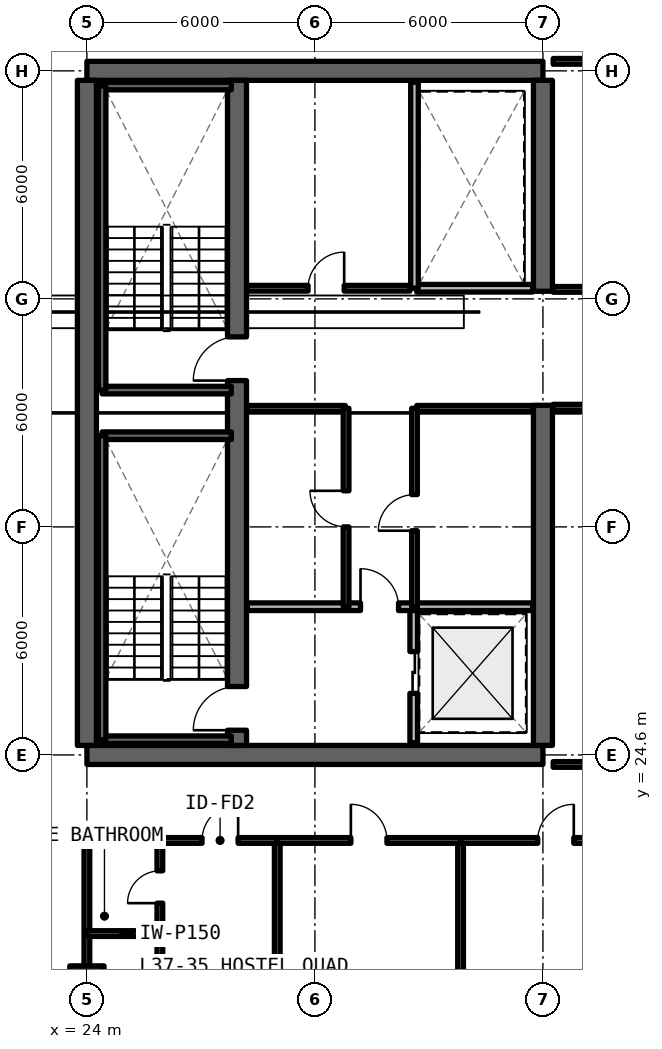
"""IFC4 building model, lengths in metres.
Left out: names, types, materials, properties, quantities, classifications, styles, units other than length and angle.
Written with IfcOpenShell. Run it as: python <this file> out.ifc"""

import sys

from ifc_helpers import new_model, si_unit, direction, frame, frame_2d, origin, origin_2d, place, context, subcontext, project, spatial, rectangle, extrude, element, fill, save


model = new_model("IFC4")
c1 = context("Model", 3, precision=1e-05, world=origin(), true_north=direction((0.0, 1.0)))
c2 = subcontext(c1, "Body", "Model", "MODEL_VIEW")
j1 = project(units=[si_unit("LENGTHUNIT", "METRE"), si_unit("PLANEANGLEUNIT", "RADIAN")], contexts=[c1])
p1 = place(None, origin())
s1 = spatial("IfcSite", under=j1, at=p1, CompositionType="ELEMENT")
p2 = place(p1, origin())
s2 = spatial("IfcBuilding", under=s1, at=p2, CompositionType="ELEMENT")
p3 = place(p2, frame((0.0, 0.0, 135.3)))
s3 = spatial("IfcBuildingStorey", under=s2, at=p3, CompositionType="ELEMENT", Elevation=135.3)
for number, where, z_axis, x_axis in (
    (1, (24.0, 24.6, 0.0), (0.0, 0.0, 1.0), (1.0, 0.0, 0.0)),
    (2, (36.0, 42.6, 0.0), (0.0, 0.0, 1.0), (-1.0, 0.0, 0.0)),
):
    element("IfcWall", number, at=place(p3, frame(where, z_axis=z_axis, x_axis=x_axis)), inside=s3, PredefinedType="SHEAR", context=c2, shape_type="SweptSolid", body=[
        extrude(rectangle(XDim=12.0, YDim=0.5, at=frame_2d((6.0, 0.0))), origin(), (0.0, 0.0, 1.0), 3.3),
    ])
p4 = place(p3, frame((24.0, 24.85, 0.0), z_axis=(0.0, 0.0, 1.0), x_axis=(0.0, 1.0, 0.0)))
e3 = element("IfcWall", 3, at=p4, inside=s3, PredefinedType="SHEAR", context=c2, shape_type="SweptSolid", body=[
    extrude(rectangle(XDim=17.5, YDim=0.5, at=frame_2d((8.75, 0.0))), origin(), (0.0, 0.0, 1.0), 3.3),
])
p5 = place(p3, frame((36.0, 24.85, 0.0), z_axis=(0.0, 0.0, 1.0), x_axis=(0.0, 1.0, 0.0)))
e4 = element("IfcWall", 4, at=p5, inside=s3, PredefinedType="SHEAR", context=c2, shape_type="SweptSolid", body=[
    extrude(rectangle(XDim=8.95, YDim=0.5, at=frame_2d((4.475, 0.0))), origin(), (0.0, 0.0, 1.0), 3.3),
])
p6 = place(p3, frame((36.0, 36.8, 0.0), z_axis=(0.0, 0.0, 1.0), x_axis=(0.0, 1.0, 0.0)))
e5 = element("IfcWall", 5, at=p6, inside=s3, PredefinedType="SHEAR", context=c2, shape_type="SweptSolid", body=[
    extrude(rectangle(XDim=5.55, YDim=0.5, at=frame_2d((2.775, 0.0))), origin(), (0.0, 0.0, 1.0), 3.3),
])
p7 = place(p3, frame((27.95, 24.85, 0.0), z_axis=(0.0, 0.0, 1.0), x_axis=(0.0, 1.0, 0.0)))
e6 = element("IfcWall", 6, at=p7, inside=s3, PredefinedType="SHEAR", context=c2, shape_type="SweptSolid", body=[
    extrude(rectangle(XDim=17.5, YDim=0.5, at=frame_2d((8.75, 0.0))), origin(), (0.0, 0.0, 1.0), 3.3),
])
p8 = place(p7, frame((0.4, 0.0, 0.0)))
e7 = element("IfcOpeningElement", 7, at=p8, cuts=e6, PredefinedType="OPENING", context=c2, shape_type="SweptSolid", body=[
    extrude(rectangle(XDim=1.15, YDim=2.15, at=frame_2d((0.575, 1.075))), frame((0.0, 0.26, 0.0), z_axis=(0.0, -1.0, 0.0), x_axis=(1.0, 0.0, 0.0)), (0.0, 0.0, 1.0), 0.52),
])
p9 = place(p7, frame((9.6, 0.0, 0.0)))
e8 = element("IfcOpeningElement", 8, at=p9, cuts=e6, PredefinedType="OPENING", context=c2, shape_type="SweptSolid", body=[
    extrude(rectangle(XDim=1.15, YDim=2.15, at=frame_2d((0.575, 1.075))), frame((0.0, 0.26, 0.0), z_axis=(0.0, -1.0, 0.0), x_axis=(1.0, 0.0, 0.0)), (0.0, 0.0, 1.0), 0.52),
])
p10 = place(p3, frame((24.0, 18.6, 0.0), z_axis=(0.0, 0.0, 1.0), x_axis=(1.0, 0.0, 0.0)))
e9 = element("IfcColumn", 9, at=p10, inside=s3, PredefinedType="COLUMN", context=c2, shape_type="SweptSolid", body=[
    extrude(rectangle(XDim=0.9, YDim=0.9, at=origin_2d()), origin(), (0.0, 0.0, 1.0), 3.3),
])
p11 = place(p3, frame((32.6, 24.92, 0.0), z_axis=(0.0, 0.0, 1.0), x_axis=(0.0, 1.0, 0.0)))
e10 = element("IfcWall", 10, at=p11, inside=s3, PredefinedType="SOLIDWALL", context=c2, shape_type="SweptSolid", body=[
    extrude(rectangle(XDim=3.58, YDim=0.2, at=frame_2d((1.79, 0.0))), origin(), (0.0, 0.0, 1.0), 2.35),
])
p12 = place(p11, frame((1.3, 0.0, 0.0)))
e11 = element("IfcOpeningElement", 11, at=p12, cuts=e10, PredefinedType="OPENING", context=c2, shape_type="SweptSolid", body=[
    extrude(rectangle(XDim=1.1, YDim=2.2, at=frame_2d((0.55, 1.1))), frame((0.0, 0.11, 0.0), z_axis=(0.0, -1.0, 0.0), x_axis=(1.0, 0.0, 0.0)), (0.0, 0.0, 1.0), 0.22),
])
p13 = place(p3, frame((28.22, 28.5, 0.0), z_axis=(0.0, 0.0, 1.0), x_axis=(1.0, 0.0, 0.0)))
e12 = element("IfcWall", 12, at=p13, inside=s3, PredefinedType="SOLIDWALL", context=c2, shape_type="SweptSolid", body=[
    extrude(rectangle(XDim=7.51, YDim=0.2, at=frame_2d((3.755, 0.0))), origin(), (0.0, 0.0, 1.0), 2.35),
])
p14 = place(p13, frame((2.98, 0.0, 0.0)))
e13 = element("IfcOpeningElement", 13, at=p14, cuts=e12, PredefinedType="OPENING", context=c2, shape_type="SweptSolid", body=[
    extrude(rectangle(XDim=1.0, YDim=2.15, at=frame_2d((0.5, 1.075))), frame((0.0, 0.11, 0.0), z_axis=(0.0, -1.0, 0.0), x_axis=(1.0, 0.0, 0.0)), (0.0, 0.0, 1.0), 0.22),
])
p15 = place(p3, frame((28.22, 33.72, 0.0), z_axis=(0.0, 0.0, 1.0), x_axis=(1.0, 0.0, 0.0)))
e14 = element("IfcWall", 14, at=p15, inside=s3, PredefinedType="SOLIDWALL", context=c2, shape_type="SweptSolid", body=[
    extrude(rectangle(XDim=2.58, YDim=0.15, at=frame_2d((1.29, 0.0))), origin(), (0.0, 0.0, 1.0), 2.35),
])
p16 = place(p3, frame((30.82, 28.5, 0.0), z_axis=(0.0, 0.0, 1.0), x_axis=(0.0, 1.0, 0.0)))
e15 = element("IfcWall", 15, at=p16, inside=s3, PredefinedType="SOLIDWALL", context=c2, shape_type="SweptSolid", body=[
    extrude(rectangle(XDim=5.22, YDim=0.15, at=frame_2d((2.61, 0.0))), origin(), (0.0, 0.0, 1.0), 2.35),
])
p17 = place(p16, frame((2.1, 0.0, 0.0)))
e16 = element("IfcOpeningElement", 16, at=p17, cuts=e15, PredefinedType="OPENING", context=c2, shape_type="SweptSolid", body=[
    extrude(rectangle(XDim=0.95, YDim=2.15, at=frame_2d((0.475, 1.075))), frame((0.0, 0.085, 0.0), z_axis=(0.0, -1.0, 0.0), x_axis=(1.0, 0.0, 0.0)), (0.0, 0.0, 1.0), 0.17),
])
p18 = place(p3, frame((32.68, 33.72, 0.0), z_axis=(0.0, 0.0, 1.0), x_axis=(1.0, 0.0, 0.0)))
e17 = element("IfcWall", 17, at=p18, inside=s3, PredefinedType="SOLIDWALL", context=c2, shape_type="SweptSolid", body=[
    extrude(rectangle(XDim=3.05, YDim=0.15, at=frame_2d((1.525, 0.0))), origin(), (0.0, 0.0, 1.0), 2.35),
])
p19 = place(p3, frame((32.62, 28.5, 0.0), z_axis=(0.0, 0.0, 1.0), x_axis=(0.0, 1.0, 0.0)))
e18 = element("IfcWall", 18, at=p19, inside=s3, PredefinedType="SOLIDWALL", context=c2, shape_type="SweptSolid", body=[
    extrude(rectangle(XDim=5.22, YDim=0.15, at=frame_2d((2.61, 0.0))), origin(), (0.0, 0.0, 1.0), 2.35),
])
p20 = place(p19, frame((2.0, 0.0, 0.0)))
e19 = element("IfcOpeningElement", 19, at=p20, cuts=e18, PredefinedType="OPENING", context=c2, shape_type="SweptSolid", body=[
    extrude(rectangle(XDim=0.95, YDim=2.15, at=frame_2d((0.475, 1.075))), frame((0.0, 0.085, 0.0), z_axis=(0.0, -1.0, 0.0), x_axis=(1.0, 0.0, 0.0)), (0.0, 0.0, 1.0), 0.17),
])
p21 = place(p3, frame((28.22, 36.88, 0.0), z_axis=(0.0, 0.0, 1.0), x_axis=(1.0, 0.0, 0.0)))
e20 = element("IfcWall", 20, at=p21, inside=s3, PredefinedType="SOLIDWALL", context=c2, shape_type="SweptSolid", body=[
    extrude(rectangle(XDim=4.28, YDim=0.15, at=frame_2d((2.14, 0.0))), origin(), (0.0, 0.0, 1.0), 2.35),
])
p22 = place(p21, frame((1.6, 0.0, 0.0)))
e21 = element("IfcOpeningElement", 21, at=p22, cuts=e20, PredefinedType="OPENING", context=c2, shape_type="SweptSolid", body=[
    extrude(rectangle(XDim=0.95, YDim=2.15, at=frame_2d((0.475, 1.075))), frame((0.0, 0.085, 0.0), z_axis=(0.0, -1.0, 0.0), x_axis=(1.0, 0.0, 0.0)), (0.0, 0.0, 1.0), 0.17),
])
p23 = place(p3, frame((32.68, 36.88, 0.0), z_axis=(0.0, 0.0, 1.0), x_axis=(1.0, 0.0, 0.0)))
e22 = element("IfcWall", 22, at=p23, inside=s3, PredefinedType="SOLIDWALL", context=c2, shape_type="SweptSolid", body=[
    extrude(rectangle(XDim=3.05, YDim=0.2, at=frame_2d((1.525, 0.0))), origin(), (0.0, 0.0, 1.0), 2.35),
])
p24 = place(p3, frame((32.62, 36.88, 0.0), z_axis=(0.0, 0.0, 1.0), x_axis=(0.0, 1.0, 0.0)))
e23 = element("IfcWall", 23, at=p24, inside=s3, PredefinedType="SOLIDWALL", context=c2, shape_type="SweptSolid", body=[
    extrude(rectangle(XDim=5.42, YDim=0.2, at=frame_2d((2.71, 0.0))), origin(), (0.0, 0.0, 1.0), 2.35),
])
p25 = place(p3, frame((36.27, 24.35, 0.0), z_axis=(0.0, 0.0, 1.0), x_axis=(1.0, 0.0, 0.0)))
e24 = element("IfcWall", 24, at=p25, inside=s3, PredefinedType="SOLIDWALL", context=c2, shape_type="SweptSolid", body=[
    extrude(rectangle(XDim=7.88, YDim=0.15, at=frame_2d((3.94, 0.0))), origin(), (0.0, 0.0, 1.0), 2.35),
])
p26 = place(p3, frame((36.27, 33.75, 0.0), z_axis=(0.0, 0.0, 1.0), x_axis=(1.0, 0.0, 0.0)))
e25 = element("IfcWall", 25, at=p26, inside=s3, PredefinedType="SOLIDWALL", context=c2, shape_type="SweptSolid", body=[
    extrude(rectangle(XDim=7.88, YDim=0.15, at=frame_2d((3.94, 0.0))), origin(), (0.0, 0.0, 1.0), 2.35),
])
p27 = place(p26, frame((3.465, 0.0, 0.0)))
e26 = element("IfcOpeningElement", 26, at=p27, cuts=e25, PredefinedType="OPENING", context=c2, shape_type="SweptSolid", body=[
    extrude(rectangle(XDim=0.95, YDim=2.15, at=frame_2d((0.475, 1.075))), frame((0.0, 0.085, 0.0), z_axis=(0.0, -1.0, 0.0), x_axis=(1.0, 0.0, 0.0)), (0.0, 0.0, 1.0), 0.17),
])
p28 = place(p3, frame((36.27, 36.85, 0.0), z_axis=(0.0, 0.0, 1.0), x_axis=(1.0, 0.0, 0.0)))
e27 = element("IfcWall", 27, at=p28, inside=s3, PredefinedType="SOLIDWALL", context=c2, shape_type="SweptSolid", body=[
    extrude(rectangle(XDim=7.88, YDim=0.15, at=frame_2d((3.94, 0.0))), origin(), (0.0, 0.0, 1.0), 2.35),
])
p29 = place(p28, frame((3.465, 0.0, 0.0)))
e28 = element("IfcOpeningElement", 28, at=p29, cuts=e27, PredefinedType="OPENING", context=c2, shape_type="SweptSolid", body=[
    extrude(rectangle(XDim=0.95, YDim=2.15, at=frame_2d((0.475, 1.075))), frame((0.0, 0.085, 0.0), z_axis=(0.0, -1.0, 0.0), x_axis=(1.0, 0.0, 0.0)), (0.0, 0.0, 1.0), 0.17),
])
p30 = place(p3, frame((36.27, 42.85, 0.0), z_axis=(0.0, 0.0, 1.0), x_axis=(1.0, 0.0, 0.0)))
e29 = element("IfcWall", 29, at=p30, inside=s3, PredefinedType="SOLIDWALL", context=c2, shape_type="SweptSolid", body=[
    extrude(rectangle(XDim=7.88, YDim=0.15, at=frame_2d((3.94, 0.0))), origin(), (0.0, 0.0, 1.0), 2.35),
])
for number, where, z_axis, x_axis in (
    (30, (24.0, 12.15, 0.0), (0.0, 0.0, 1.0), (0.0, 1.0, 0.0)),
    (31, (29.009, 12.15, 0.0), (0.0, 0.0, 1.0), (0.0, 1.0, 0.0)),
):
    element("IfcWall", number, at=place(p3, frame(where, z_axis=z_axis, x_axis=x_axis)), inside=s3, PredefinedType="SOLIDWALL", context=c2, shape_type="SweptSolid", body=[
        extrude(rectangle(XDim=10.2, YDim=0.15, at=frame_2d((5.1, 0.0))), origin(), (0.0, 0.0, 1.0), 2.35),
    ])
p31 = place(p3, frame((24.0, 19.9, 0.0), z_axis=(0.0, 0.0, 1.0), x_axis=(1.0, 0.0, 0.0)))
e32 = element("IfcWall", 32, at=p31, inside=s3, PredefinedType="PARTITIONING", context=c2, shape_type="SweptSolid", body=[
    extrude(rectangle(XDim=1.92, YDim=0.15, at=frame_2d((0.96, 0.0))), origin(), (0.0, 0.0, 1.0), 2.35),
])
p32 = place(p3, frame((25.92, 12.15, 0.0), z_axis=(0.0, 0.0, 1.0), x_axis=(0.0, 1.0, 0.0)))
e33 = element("IfcWall", 33, at=p32, inside=s3, PredefinedType="PARTITIONING", context=c2, shape_type="SweptSolid", body=[
    extrude(rectangle(XDim=10.2, YDim=0.15, at=frame_2d((5.1, 0.0))), origin(), (0.0, 0.0, 1.0), 2.35),
])
p33 = place(p32, frame((2.96, 0.0, 0.0)))
e34 = element("IfcOpeningElement", 34, at=p33, cuts=e33, PredefinedType="OPENING", context=c2, shape_type="SweptSolid", body=[
    extrude(rectangle(XDim=0.85, YDim=2.1, at=frame_2d((0.425, 1.05))), frame((0.0, 0.085, 0.0), z_axis=(0.0, -1.0, 0.0), x_axis=(1.0, 0.0, 0.0)), (0.0, 0.0, 1.0), 0.17),
])
p34 = place(p32, frame((8.55, 0.0, 0.0)))
e35 = element("IfcOpeningElement", 35, at=p34, cuts=e33, PredefinedType="OPENING", context=c2, shape_type="SweptSolid", body=[
    extrude(rectangle(XDim=0.85, YDim=2.1, at=frame_2d((0.425, 1.05))), frame((0.0, 0.085, 0.0), z_axis=(0.0, -1.0, 0.0), x_axis=(1.0, 0.0, 0.0)), (0.0, 0.0, 1.0), 0.17),
])
p35 = place(p3, frame((24.0, 22.35, 0.0), z_axis=(0.0, 0.0, 1.0), x_axis=(1.0, 0.0, 0.0)))
e36 = element("IfcWall", 36, at=p35, inside=s3, PredefinedType="SOLIDWALL", context=c2, shape_type="SweptSolid", body=[
    extrude(rectangle(XDim=5.009, YDim=0.15, at=frame_2d((2.504, 0.0))), origin(), (0.0, 0.0, 1.0), 2.35),
])
p36 = place(p35, frame((3.03, 0.0, 0.0)))
e37 = element("IfcOpeningElement", 37, at=p36, cuts=e36, PredefinedType="OPENING", context=c2, shape_type="SweptSolid", body=[
    extrude(rectangle(XDim=0.95, YDim=2.15, at=frame_2d((0.475, 1.075))), frame((0.0, 0.085, 0.0), z_axis=(0.0, -1.0, 0.0), x_axis=(1.0, 0.0, 0.0)), (0.0, 0.0, 1.0), 0.17),
])
p37 = place(p3, frame((33.833, 12.15, 0.0), z_axis=(0.0, 0.0, 1.0), x_axis=(0.0, 1.0, 0.0)))
e38 = element("IfcWall", 38, at=p37, inside=s3, PredefinedType="SOLIDWALL", context=c2, shape_type="SweptSolid", body=[
    extrude(rectangle(XDim=10.2, YDim=0.15, at=frame_2d((5.1, 0.0))), origin(), (0.0, 0.0, 1.0), 2.35),
])
p38 = place(p3, frame((29.009, 22.35, 0.0), z_axis=(0.0, 0.0, 1.0), x_axis=(1.0, 0.0, 0.0)))
e39 = element("IfcWall", 39, at=p38, inside=s3, PredefinedType="SOLIDWALL", context=c2, shape_type="SweptSolid", body=[
    extrude(rectangle(XDim=4.824, YDim=0.15, at=frame_2d((2.412, 0.0))), origin(), (0.0, 0.0, 1.0), 2.35),
])
p39 = place(p38, frame((1.937, 0.0, 0.0)))
e40 = element("IfcOpeningElement", 40, at=p39, cuts=e39, PredefinedType="OPENING", context=c2, shape_type="SweptSolid", body=[
    extrude(rectangle(XDim=0.95, YDim=2.15, at=frame_2d((0.475, 1.075))), frame((0.0, 0.085, 0.0), z_axis=(0.0, -1.0, 0.0), x_axis=(1.0, 0.0, 0.0)), (0.0, 0.0, 1.0), 0.17),
])
p40 = place(p3, frame((33.833, 22.35, 0.0), z_axis=(0.0, 0.0, 1.0), x_axis=(1.0, 0.0, 0.0)))
e41 = element("IfcWall", 41, at=p40, inside=s3, PredefinedType="SOLIDWALL", context=c2, shape_type="SweptSolid", body=[
    extrude(rectangle(XDim=5.009, YDim=0.15, at=frame_2d((2.504, 0.0))), origin(), (0.0, 0.0, 1.0), 2.35),
])
p41 = place(p40, frame((2.03, 0.0, 0.0)))
e42 = element("IfcOpeningElement", 42, at=p41, cuts=e41, PredefinedType="OPENING", context=c2, shape_type="SweptSolid", body=[
    extrude(rectangle(XDim=0.95, YDim=2.15, at=frame_2d((0.475, 1.075))), frame((0.0, 0.085, 0.0), z_axis=(0.0, -1.0, 0.0), x_axis=(1.0, 0.0, 0.0)), (0.0, 0.0, 1.0), 0.17),
])
for number, where, z_axis, x_axis in (
    (43, (24.4, 25.0, 0.0), (0.0, 0.0, 1.0), (1.0, 0.0, 0.0)),
    (44, (27.8, 33.0, 0.0), (0.0, 0.0, 1.0), (-1.0, 0.0, 0.0)),
):
    element("IfcWall", number, at=place(p3, frame(where, z_axis=z_axis, x_axis=x_axis)), inside=s3, PredefinedType="SOLIDWALL", context=c2, shape_type="SweptSolid", body=[
        extrude(rectangle(XDim=3.4, YDim=0.2, at=frame_2d((1.7, 0.0))), origin(), (0.0, 0.0, 1.0), 3.3),
    ])
p42 = place(p3, frame((24.4, 33.0, 0.0), z_axis=(0.0, 0.0, 1.0), x_axis=(0.0, -1.0, 0.0)))
e45 = element("IfcWall", 45, at=p42, inside=s3, PredefinedType="SOLIDWALL", context=c2, shape_type="SweptSolid", body=[
    extrude(rectangle(XDim=8.0, YDim=0.2, at=frame_2d((4.0, 0.0))), origin(), (0.0, 0.0, 1.0), 3.3),
])
for number, where, z_axis, x_axis in (
    (46, (24.4, 34.2, 0.0), (0.0, 0.0, 1.0), (1.0, 0.0, 0.0)),
    (47, (27.8, 42.2, 0.0), (0.0, 0.0, 1.0), (-1.0, 0.0, 0.0)),
):
    element("IfcWall", number, at=place(p3, frame(where, z_axis=z_axis, x_axis=x_axis)), inside=s3, PredefinedType="SOLIDWALL", context=c2, shape_type="SweptSolid", body=[
        extrude(rectangle(XDim=3.4, YDim=0.2, at=frame_2d((1.7, 0.0))), origin(), (0.0, 0.0, 1.0), 3.3),
    ])
p43 = place(p3, frame((24.4, 42.2, 0.0), z_axis=(0.0, 0.0, 1.0), x_axis=(0.0, -1.0, 0.0)))
e48 = element("IfcWall", 48, at=p43, inside=s3, PredefinedType="SOLIDWALL", context=c2, shape_type="SweptSolid", body=[
    extrude(rectangle(XDim=8.0, YDim=0.2, at=frame_2d((4.0, 0.0))), origin(), (0.0, 0.0, 1.0), 3.3),
])
p44 = place(p12, origin())
e49 = element("IfcDoor", 49, at=p44, inside=s3, OperationType="SLIDING_TO_LEFT", PredefinedType="DOOR", context=c2, shape_type="SweptSolid", body=[
    extrude(rectangle(XDim=1.1, YDim=2.2, at=frame_2d((0.55, 1.1))), frame((0.0, 0.025, 0.0), z_axis=(0.0, -1.0, 0.0), x_axis=(1.0, 0.0, 0.0)), (0.0, 0.0, 1.0), 0.05),
])
fill(e11, e49)
p45 = place(p14, origin())
e50 = element("IfcDoor", 50, at=p45, inside=s3, OperationType="SINGLE_SWING_LEFT", PredefinedType="DOOR", context=c2, shape_type="SweptSolid", body=[
    extrude(rectangle(XDim=1.0, YDim=2.15, at=frame_2d((0.5, 1.075))), frame((0.0, 0.025, 0.0), z_axis=(0.0, -1.0, 0.0), x_axis=(1.0, 0.0, 0.0)), (0.0, 0.0, 1.0), 0.05),
])
fill(e13, e50)
p46 = place(p17, origin())
e51 = element("IfcDoor", 51, at=p46, inside=s3, OperationType="SINGLE_SWING_RIGHT", PredefinedType="DOOR", context=c2, shape_type="SweptSolid", body=[
    extrude(rectangle(XDim=0.95, YDim=2.15, at=frame_2d((0.475, 1.075))), frame((0.0, 0.025, 0.0), z_axis=(0.0, -1.0, 0.0), x_axis=(1.0, 0.0, 0.0)), (0.0, 0.0, 1.0), 0.05),
])
fill(e16, e51)
p47 = place(p20, origin())
e52 = element("IfcDoor", 52, at=p47, inside=s3, OperationType="SINGLE_SWING_LEFT", PredefinedType="DOOR", context=c2, shape_type="SweptSolid", body=[
    extrude(rectangle(XDim=0.95, YDim=2.15, at=frame_2d((0.475, 1.075))), frame((0.0, 0.025, 0.0), z_axis=(0.0, -1.0, 0.0), x_axis=(1.0, 0.0, 0.0)), (0.0, 0.0, 1.0), 0.05),
])
fill(e19, e52)
p48 = place(p22, origin())
e53 = element("IfcDoor", 53, at=p48, inside=s3, OperationType="SINGLE_SWING_RIGHT", PredefinedType="DOOR", context=c2, shape_type="SweptSolid", body=[
    extrude(rectangle(XDim=0.95, YDim=2.15, at=frame_2d((0.475, 1.075))), frame((0.0, 0.025, 0.0), z_axis=(0.0, -1.0, 0.0), x_axis=(1.0, 0.0, 0.0)), (0.0, 0.0, 1.0), 0.05),
])
fill(e21, e53)
p49 = place(p34, origin())
e54 = element("IfcDoor", 54, at=p49, inside=s3, OperationType="SINGLE_SWING_LEFT", PredefinedType="DOOR", context=c2, shape_type="SweptSolid", body=[
    extrude(rectangle(XDim=0.85, YDim=2.1, at=frame_2d((0.425, 1.05))), frame((0.0, 0.025, 0.0), z_axis=(0.0, -1.0, 0.0), x_axis=(1.0, 0.0, 0.0)), (0.0, 0.0, 1.0), 0.05),
])
fill(e35, e54)
p50 = place(p36, origin())
e55 = element("IfcDoor", 55, at=p50, inside=s3, OperationType="SINGLE_SWING_RIGHT", PredefinedType="DOOR", context=c2, shape_type="SweptSolid", body=[
    extrude(rectangle(XDim=0.95, YDim=2.15, at=frame_2d((0.475, 1.075))), frame((0.0, 0.025, 0.0), z_axis=(0.0, -1.0, 0.0), x_axis=(1.0, 0.0, 0.0)), (0.0, 0.0, 1.0), 0.05),
])
fill(e37, e55)
p51 = place(p39, origin())
e56 = element("IfcDoor", 56, at=p51, inside=s3, OperationType="SINGLE_SWING_LEFT", PredefinedType="DOOR", context=c2, shape_type="SweptSolid", body=[
    extrude(rectangle(XDim=0.95, YDim=2.15, at=frame_2d((0.475, 1.075))), frame((0.0, 0.025, 0.0), z_axis=(0.0, -1.0, 0.0), x_axis=(1.0, 0.0, 0.0)), (0.0, 0.0, 1.0), 0.05),
])
fill(e40, e56)
p52 = place(p41, origin())
e57 = element("IfcDoor", 57, at=p52, inside=s3, OperationType="SINGLE_SWING_RIGHT", PredefinedType="DOOR", context=c2, shape_type="SweptSolid", body=[
    extrude(rectangle(XDim=0.95, YDim=2.15, at=frame_2d((0.475, 1.075))), frame((0.0, 0.025, 0.0), z_axis=(0.0, -1.0, 0.0), x_axis=(1.0, 0.0, 0.0)), (0.0, 0.0, 1.0), 0.05),
])
fill(e42, e57)
p53 = place(p8, origin())
e58 = element("IfcDoor", 58, at=p53, inside=s3, OperationType="SINGLE_SWING_LEFT", PredefinedType="DOOR", context=c2, shape_type="SweptSolid", body=[
    extrude(rectangle(XDim=1.15, YDim=2.15, at=frame_2d((0.575, 1.075))), frame((0.0, 0.025, 0.0), z_axis=(0.0, -1.0, 0.0), x_axis=(1.0, 0.0, 0.0)), (0.0, 0.0, 1.0), 0.05),
])
fill(e7, e58)
p54 = place(p9, origin())
e59 = element("IfcDoor", 59, at=p54, inside=s3, OperationType="SINGLE_SWING_RIGHT", PredefinedType="DOOR", context=c2, shape_type="SweptSolid", body=[
    extrude(rectangle(XDim=1.15, YDim=2.15, at=frame_2d((0.575, 1.075))), frame((0.0, 0.025, 0.0), z_axis=(0.0, -1.0, 0.0), x_axis=(1.0, 0.0, 0.0)), (0.0, 0.0, 1.0), 0.05),
])
fill(e8, e59)
save(model, sys.argv[1])
